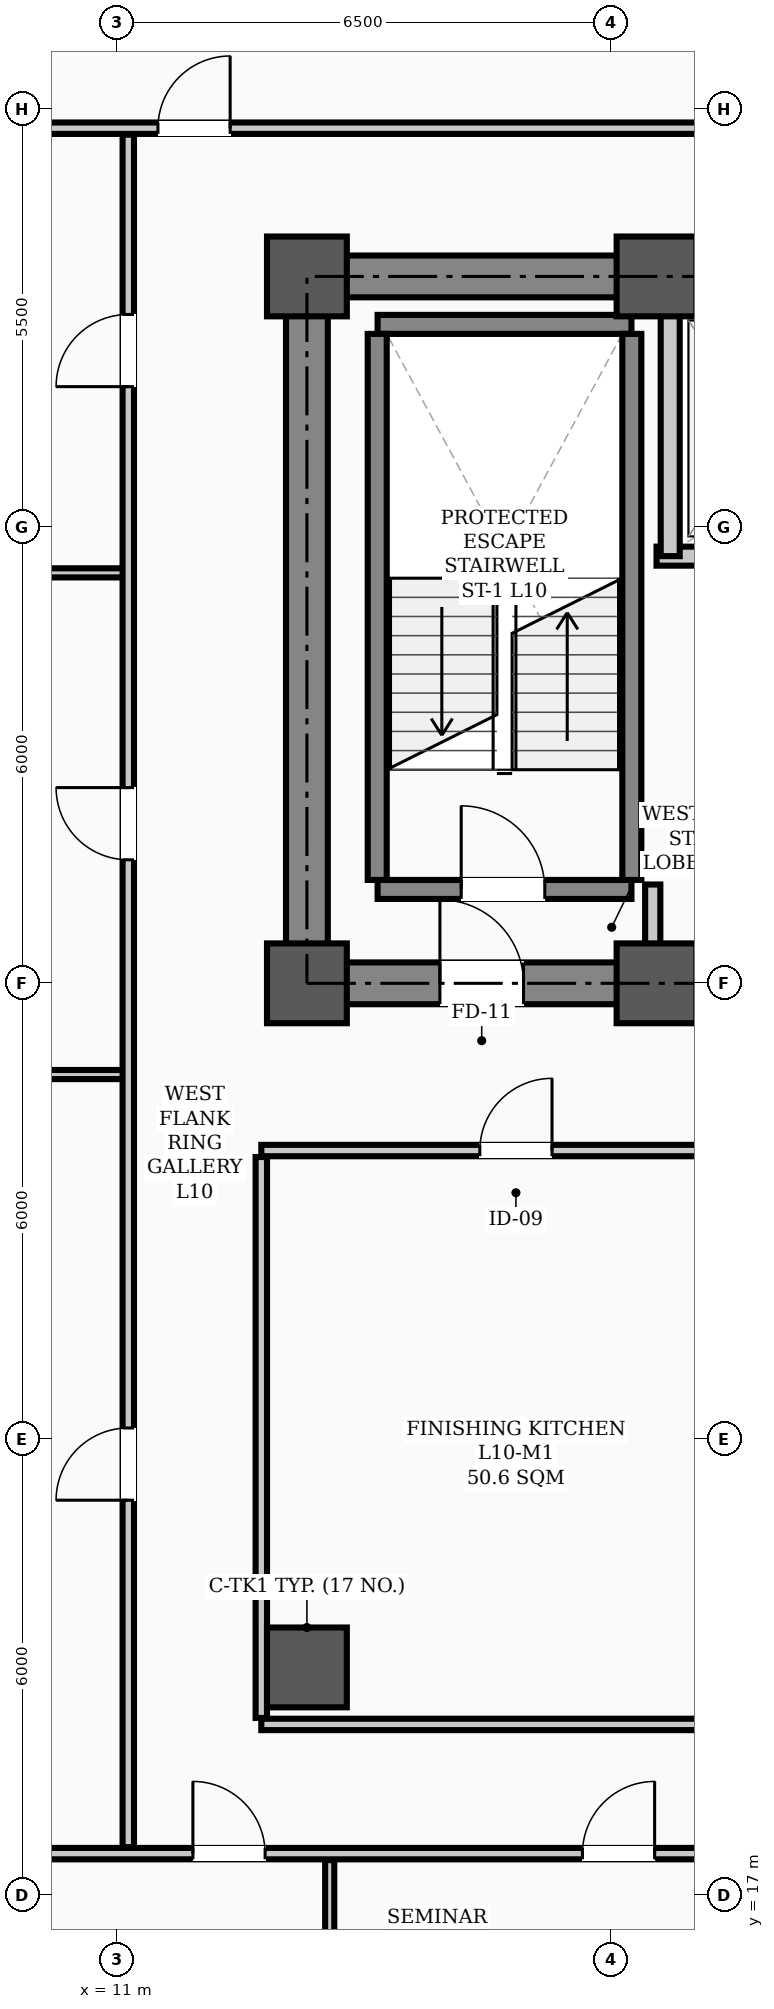
"""IFC4 building model, lengths in metres.
Left out: names, types, materials, properties, quantities, classifications, styles, units other than length and angle.
Written with IfcOpenShell. Run it as: python <this file> out.ifc"""

import sys

from ifc_helpers import new_model, si_unit, direction, frame, frame_2d, origin, origin_2d, place, context, subcontext, project, spatial, rectangle, hollow_rectangle, extrude, element, fill, save


model = new_model("IFC4")
c1 = context("Model", 3, precision=1e-05, world=origin(), true_north=direction((0.0, 1.0)))
c2 = subcontext(c1, "Body", "Model", "MODEL_VIEW")
j1 = project(units=[si_unit("LENGTHUNIT", "METRE"), si_unit("PLANEANGLEUNIT", "RADIAN")], contexts=[c1])
p1 = place(None, origin())
s1 = spatial("IfcSite", under=j1, at=p1, CompositionType="ELEMENT")
p2 = place(p1, origin())
s2 = spatial("IfcBuilding", under=s1, at=p2, CompositionType="ELEMENT")
p3 = place(p2, frame((0.0, 0.0, 42.1)))
s3 = spatial("IfcBuildingStorey", under=s2, at=p3, CompositionType="ELEMENT", Elevation=42.1)
for number, where, z_axis, x_axis in (
    (1, (13.5, 29.0, 0.0), (0.0, 0.0, 1.0), (1.0, 0.0, 0.0)),
    (2, (13.5, 38.3, 0.0), (0.0, 0.0, 1.0), (1.0, 0.0, 0.0)),
    (3, (18.1, 29.0, 0.0), (0.0, 0.0, 1.0), (1.0, 0.0, 0.0)),
    (4, (18.1, 38.3, 0.0), (0.0, 0.0, 1.0), (1.0, 0.0, 0.0)),
    (5, (13.5, 20.0, 0.0), (0.0, 0.0, 1.0), (1.0, 0.0, 0.0)),
):
    element("IfcColumn", number, at=place(p3, frame(where, z_axis=z_axis, x_axis=x_axis)), inside=s3, PredefinedType="COLUMN", context=c2, shape_type="SweptSolid", body=[
        extrude(hollow_rectangle(XDim=1.05, YDim=1.05, WallThickness=0.038, InnerFilletRadius=0.019, OuterFilletRadius=0.057, at=origin_2d()), origin(), (0.0, 0.0, 1.0), 3.9),
    ])
p4 = place(p3, frame((13.5, 29.0, 0.0), z_axis=(0.0, 0.0, 1.0), x_axis=(1.0, 0.0, 0.0)))
e6 = element("IfcWall", 6, at=p4, inside=s3, PredefinedType="SHEAR", context=c2, shape_type="SweptSolid", body=[
    extrude(rectangle(XDim=30.5, YDim=0.55, at=frame_2d((15.25, 0.0))), origin(), (0.0, 0.0, 1.0), 3.72),
])
p5 = place(p4, frame((1.75, 0.0, 0.0)))
e7 = element("IfcOpeningElement", 7, at=p5, cuts=e6, PredefinedType="OPENING", context=c2, shape_type="SweptSolid", body=[
    extrude(rectangle(XDim=1.1, YDim=2.08, at=frame_2d((0.55, 1.04))), frame((0.0, 0.285, 0.0), z_axis=(0.0, -1.0, 0.0), x_axis=(1.0, 0.0, 0.0)), (0.0, 0.0, 1.0), 0.57),
])
p6 = place(p4, frame((26.7, 0.0, 0.0)))
e8 = element("IfcOpeningElement", 8, at=p6, cuts=e6, PredefinedType="OPENING", context=c2, shape_type="SweptSolid", body=[
    extrude(rectangle(XDim=1.1, YDim=2.08, at=frame_2d((0.55, 1.04))), frame((0.0, 0.285, 0.0), z_axis=(0.0, -1.0, 0.0), x_axis=(1.0, 0.0, 0.0)), (0.0, 0.0, 1.0), 0.57),
])
p7 = place(p4, frame((6.8, 0.0, 0.0)))
e9 = element("IfcOpeningElement", 9, at=p7, cuts=e6, PredefinedType="OPENING", context=c2, shape_type="SweptSolid", body=[
    extrude(rectangle(XDim=1.1, YDim=2.08, at=frame_2d((0.55, 1.04))), frame((0.0, 0.285, 0.0), z_axis=(0.0, -1.0, 0.0), x_axis=(1.0, 0.0, 0.0)), (0.0, 0.0, 1.0), 0.57),
])
p8 = place(p4, frame((13.2, 0.0, 0.0)))
e10 = element("IfcOpeningElement", 10, at=p8, cuts=e6, PredefinedType="OPENING", context=c2, shape_type="SweptSolid", body=[
    extrude(rectangle(XDim=1.6, YDim=2.08, at=frame_2d((0.8, 1.04))), frame((0.0, 0.285, 0.0), z_axis=(0.0, -1.0, 0.0), x_axis=(1.0, 0.0, 0.0)), (0.0, 0.0, 1.0), 0.57),
])
p9 = place(p4, frame((20.525, 0.0, 0.0)))
e11 = element("IfcOpeningElement", 11, at=p9, cuts=e6, PredefinedType="OPENING", context=c2, shape_type="SweptSolid", body=[
    extrude(rectangle(XDim=0.95, YDim=2.08, at=frame_2d((0.475, 1.04))), frame((0.0, 0.285, 0.0), z_axis=(0.0, -1.0, 0.0), x_axis=(1.0, 0.0, 0.0)), (0.0, 0.0, 1.0), 0.57),
])
p10 = place(p3, frame((13.5, 38.3, 0.0), z_axis=(0.0, 0.0, 1.0), x_axis=(1.0, 0.0, 0.0)))
e12 = element("IfcWall", 12, at=p10, inside=s3, PredefinedType="SHEAR", context=c2, shape_type="SweptSolid", body=[
    extrude(rectangle(XDim=30.5, YDim=0.55, at=frame_2d((15.25, 0.0))), origin(), (0.0, 0.0, 1.0), 3.72),
])
p11 = place(p3, frame((13.5, 29.35, 0.0), z_axis=(0.0, 0.0, 1.0), x_axis=(0.0, 1.0, 0.0)))
e13 = element("IfcWall", 13, at=p11, inside=s3, PredefinedType="SHEAR", context=c2, shape_type="SweptSolid", body=[
    extrude(rectangle(XDim=8.6, YDim=0.55, at=frame_2d((4.3, 0.0))), origin(), (0.0, 0.0, 1.0), 3.72),
])
p12 = place(p3, frame((14.43, 30.235, 0.0), z_axis=(0.0, 0.0, 1.0), x_axis=(1.0, 0.0, 0.0)))
e14 = element("IfcWall", 14, at=p12, inside=s3, PredefinedType="STANDARD", context=c2, shape_type="SweptSolid", body=[
    extrude(rectangle(XDim=3.34, YDim=0.25, at=frame_2d((1.67, 0.0))), origin(), (0.0, 0.0, 1.0), 3.72),
])
p13 = place(p12, frame((1.1, 0.0, 0.0)))
e15 = element("IfcOpeningElement", 15, at=p13, cuts=e14, PredefinedType="OPENING", context=c2, shape_type="SweptSolid", body=[
    extrude(rectangle(XDim=1.1, YDim=2.08, at=frame_2d((0.55, 1.04))), frame((0.0, 0.135, 0.0), z_axis=(0.0, -1.0, 0.0), x_axis=(1.0, 0.0, 0.0)), (0.0, 0.0, 1.0), 0.27),
])
p14 = place(p3, frame((14.43, 37.669, 0.0), z_axis=(0.0, 0.0, 1.0), x_axis=(1.0, 0.0, 0.0)))
e16 = element("IfcWall", 16, at=p14, inside=s3, PredefinedType="STANDARD", context=c2, shape_type="SweptSolid", body=[
    extrude(rectangle(XDim=3.34, YDim=0.25, at=frame_2d((1.67, 0.0))), origin(), (0.0, 0.0, 1.0), 3.72),
])
for number, where, z_axis, x_axis in (
    (17, (14.425, 30.36, 0.0), (0.0, 0.0, 1.0), (0.0, 1.0, 0.0)),
    (18, (17.775, 30.36, 0.0), (0.0, 0.0, 1.0), (0.0, 1.0, 0.0)),
):
    element("IfcWall", number, at=place(p3, frame(where, z_axis=z_axis, x_axis=x_axis)), inside=s3, PredefinedType="STANDARD", context=c2, shape_type="SweptSolid", body=[
        extrude(rectangle(XDim=7.184, YDim=0.25, at=frame_2d((3.592, 0.0))), origin(), (0.0, 0.0, 1.0), 3.72),
    ])
p15 = place(p3, frame((18.1, 34.62, 0.0), z_axis=(0.0, 0.0, 1.0), x_axis=(1.0, 0.0, 0.0)))
e19 = element("IfcWall", 19, at=p15, inside=s3, PredefinedType="STANDARD", context=c2, shape_type="SweptSolid", body=[
    extrude(rectangle(XDim=5.35, YDim=0.25, at=frame_2d((2.675, 0.0))), origin(), (0.0, 0.0, 1.0), 3.72),
])
p16 = place(p15, frame((0.85, 0.0, 0.0)))
e20 = element("IfcOpeningElement", 20, at=p16, cuts=e19, PredefinedType="OPENING", context=c2, shape_type="SweptSolid", body=[
    extrude(rectangle(XDim=1.1, YDim=2.08, at=frame_2d((0.55, 1.04))), frame((0.0, 0.135, 0.0), z_axis=(0.0, -1.0, 0.0), x_axis=(1.0, 0.0, 0.0)), (0.0, 0.0, 1.0), 0.27),
])
p17 = place(p15, frame((3.45, 0.0, 0.0)))
e21 = element("IfcOpeningElement", 21, at=p17, cuts=e19, PredefinedType="OPENING", context=c2, shape_type="SweptSolid", body=[
    extrude(rectangle(XDim=1.1, YDim=2.08, at=frame_2d((0.55, 1.04))), frame((0.0, 0.135, 0.0), z_axis=(0.0, -1.0, 0.0), x_axis=(1.0, 0.0, 0.0)), (0.0, 0.0, 1.0), 0.27),
])
p18 = place(p3, frame((18.28, 34.62, 0.0), z_axis=(0.0, 0.0, 1.0), x_axis=(0.0, 1.0, 0.0)))
e22 = element("IfcWall", 22, at=p18, inside=s3, PredefinedType="STANDARD", context=c2, shape_type="SweptSolid", body=[
    extrude(rectangle(XDim=3.33, YDim=0.25, at=frame_2d((1.665, 0.0))), origin(), (0.0, 0.0, 1.0), 3.3),
])
p19 = place(p3, frame((12.9, 26.8, 0.0), z_axis=(0.0, 0.0, 1.0), x_axis=(1.0, 0.0, 0.0)))
e23 = element("IfcWall", 23, at=p19, inside=s3, PredefinedType="PARTITIONING", context=c2, shape_type="SweptSolid", body=[
    extrude(rectangle(XDim=31.7, YDim=0.15, at=frame_2d((15.85, 0.0))), origin(), (0.0, 0.0, 1.0), 3.1),
])
p20 = place(p19, frame((13.6, 0.0, 0.0)))
e24 = element("IfcOpeningElement", 24, at=p20, cuts=e23, PredefinedType="OPENING", context=c2, shape_type="SweptSolid", body=[
    extrude(rectangle(XDim=1.6, YDim=2.08, at=frame_2d((0.8, 1.04))), frame((0.0, 0.085, 0.0), z_axis=(0.0, -1.0, 0.0), x_axis=(1.0, 0.0, 0.0)), (0.0, 0.0, 1.0), 0.17),
])
p21 = place(p19, frame((2.875, 0.0, 0.0)))
e25 = element("IfcOpeningElement", 25, at=p21, cuts=e23, PredefinedType="OPENING", context=c2, shape_type="SweptSolid", body=[
    extrude(rectangle(XDim=0.95, YDim=2.08, at=frame_2d((0.475, 1.04))), frame((0.0, 0.085, 0.0), z_axis=(0.0, -1.0, 0.0), x_axis=(1.0, 0.0, 0.0)), (0.0, 0.0, 1.0), 0.17),
])
p22 = place(p19, frame((8.625, 0.0, 0.0)))
e26 = element("IfcOpeningElement", 26, at=p22, cuts=e23, PredefinedType="OPENING", context=c2, shape_type="SweptSolid", body=[
    extrude(rectangle(XDim=0.95, YDim=2.08, at=frame_2d((0.475, 1.04))), frame((0.0, 0.085, 0.0), z_axis=(0.0, -1.0, 0.0), x_axis=(1.0, 0.0, 0.0)), (0.0, 0.0, 1.0), 0.17),
])
p23 = place(p19, frame((16.075, 0.0, 0.0)))
e27 = element("IfcOpeningElement", 27, at=p23, cuts=e23, PredefinedType="OPENING", context=c2, shape_type="SweptSolid", body=[
    extrude(rectangle(XDim=0.95, YDim=2.08, at=frame_2d((0.475, 1.04))), frame((0.0, 0.085, 0.0), z_axis=(0.0, -1.0, 0.0), x_axis=(1.0, 0.0, 0.0)), (0.0, 0.0, 1.0), 0.17),
])
p24 = place(p19, frame((21.875, 0.0, 0.0)))
e28 = element("IfcOpeningElement", 28, at=p24, cuts=e23, PredefinedType="OPENING", context=c2, shape_type="SweptSolid", body=[
    extrude(rectangle(XDim=0.95, YDim=2.08, at=frame_2d((0.475, 1.04))), frame((0.0, 0.085, 0.0), z_axis=(0.0, -1.0, 0.0), x_axis=(1.0, 0.0, 0.0)), (0.0, 0.0, 1.0), 0.17),
])
p25 = place(p19, frame((29.025, 0.0, 0.0)))
e29 = element("IfcOpeningElement", 29, at=p25, cuts=e23, PredefinedType="OPENING", context=c2, shape_type="SweptSolid", body=[
    extrude(rectangle(XDim=0.95, YDim=2.08, at=frame_2d((0.475, 1.04))), frame((0.0, 0.085, 0.0), z_axis=(0.0, -1.0, 0.0), x_axis=(1.0, 0.0, 0.0)), (0.0, 0.0, 1.0), 0.17),
])
p26 = place(p3, frame((4.66, 17.55, 0.0), z_axis=(0.0, 0.0, 1.0), x_axis=(1.0, 0.0, 0.0)))
e30 = element("IfcWall", 30, at=p26, inside=s3, PredefinedType="PARTITIONING", context=c2, shape_type="SweptSolid", body=[
    extrude(rectangle(XDim=44.68, YDim=0.15, at=frame_2d((22.34, 0.0))), origin(), (0.0, 0.0, 1.0), 3.1),
])
p27 = place(p26, frame((7.34, 0.0, 0.0)))
e31 = element("IfcOpeningElement", 31, at=p27, cuts=e30, PredefinedType="OPENING", context=c2, shape_type="SweptSolid", body=[
    extrude(rectangle(XDim=0.95, YDim=2.08, at=frame_2d((0.475, 1.04))), frame((0.0, 0.085, 0.0), z_axis=(0.0, -1.0, 0.0), x_axis=(1.0, 0.0, 0.0)), (0.0, 0.0, 1.0), 0.17),
])
p28 = place(p26, frame((12.465, 0.0, 0.0)))
e32 = element("IfcOpeningElement", 32, at=p28, cuts=e30, PredefinedType="OPENING", context=c2, shape_type="SweptSolid", body=[
    extrude(rectangle(XDim=0.95, YDim=2.08, at=frame_2d((0.475, 1.04))), frame((0.0, 0.085, 0.0), z_axis=(0.0, -1.0, 0.0), x_axis=(1.0, 0.0, 0.0)), (0.0, 0.0, 1.0), 0.17),
])
p29 = place(p26, frame((29.265, 0.0, 0.0)))
e33 = element("IfcOpeningElement", 33, at=p29, cuts=e30, PredefinedType="OPENING", context=c2, shape_type="SweptSolid", body=[
    extrude(rectangle(XDim=0.95, YDim=2.08, at=frame_2d((0.475, 1.04))), frame((0.0, 0.085, 0.0), z_axis=(0.0, -1.0, 0.0), x_axis=(1.0, 0.0, 0.0)), (0.0, 0.0, 1.0), 0.17),
])
p30 = place(p26, frame((37.265, 0.0, 0.0)))
e34 = element("IfcOpeningElement", 34, at=p30, cuts=e30, PredefinedType="OPENING", context=c2, shape_type="SweptSolid", body=[
    extrude(rectangle(XDim=0.95, YDim=2.08, at=frame_2d((0.475, 1.04))), frame((0.0, 0.085, 0.0), z_axis=(0.0, -1.0, 0.0), x_axis=(1.0, 0.0, 0.0)), (0.0, 0.0, 1.0), 0.17),
])
p31 = place(p3, frame((12.9, 19.25, 0.0), z_axis=(0.0, 0.0, 1.0), x_axis=(1.0, 0.0, 0.0)))
e35 = element("IfcWall", 35, at=p31, inside=s3, PredefinedType="PARTITIONING", context=c2, shape_type="SweptSolid", body=[
    extrude(rectangle(XDim=13.3, YDim=0.15, at=frame_2d((6.65, 0.0))), origin(), (0.0, 0.0, 1.0), 3.1),
])
for number, where, z_axis, x_axis in (
    (36, (2.31, 27.8, 0.0), (0.0, 0.0, 1.0), (1.0, 0.0, 0.0)),
    (37, (2.31, 34.4, 0.0), (0.0, 0.0, 1.0), (1.0, 0.0, 0.0)),
):
    element("IfcWall", number, at=place(p3, frame(where, z_axis=z_axis, x_axis=x_axis)), inside=s3, PredefinedType="PARTITIONING", context=c2, shape_type="SweptSolid", body=[
        extrude(rectangle(XDim=8.84, YDim=0.12, at=frame_2d((4.42, 0.0))), origin(), (0.0, 0.0, 1.0), 3.212),
    ])
p32 = place(p3, frame((2.31, 40.25, 0.0), z_axis=(0.0, 0.0, 1.0), x_axis=(1.0, 0.0, 0.0)))
e38 = element("IfcWall", 38, at=p32, inside=s3, PredefinedType="PARTITIONING", context=c2, shape_type="SweptSolid", body=[
    extrude(rectangle(XDim=49.38, YDim=0.15, at=frame_2d((24.69, 0.0))), origin(), (0.0, 0.0, 1.0), 3.1),
])
p33 = place(p32, frame((9.23, 0.0, 0.0)))
e39 = element("IfcOpeningElement", 39, at=p33, cuts=e38, PredefinedType="OPENING", context=c2, shape_type="SweptSolid", body=[
    extrude(rectangle(XDim=0.95, YDim=2.08, at=frame_2d((0.475, 1.04))), frame((0.0, 0.085, 0.0), z_axis=(0.0, -1.0, 0.0), x_axis=(1.0, 0.0, 0.0)), (0.0, 0.0, 1.0), 0.17),
])
p34 = place(p32, frame((23.115, 0.0, 0.0)))
e40 = element("IfcOpeningElement", 40, at=p34, cuts=e38, PredefinedType="OPENING", context=c2, shape_type="SweptSolid", body=[
    extrude(rectangle(XDim=0.95, YDim=2.08, at=frame_2d((0.475, 1.04))), frame((0.0, 0.085, 0.0), z_axis=(0.0, -1.0, 0.0), x_axis=(1.0, 0.0, 0.0)), (0.0, 0.0, 1.0), 0.17),
])
p35 = place(p32, frame((31.515, 0.0, 0.0)))
e41 = element("IfcOpeningElement", 41, at=p35, cuts=e38, PredefinedType="OPENING", context=c2, shape_type="SweptSolid", body=[
    extrude(rectangle(XDim=0.95, YDim=2.08, at=frame_2d((0.475, 1.04))), frame((0.0, 0.085, 0.0), z_axis=(0.0, -1.0, 0.0), x_axis=(1.0, 0.0, 0.0)), (0.0, 0.0, 1.0), 0.17),
])
p36 = place(p32, frame((42.7, 0.0, 0.0)))
e42 = element("IfcOpeningElement", 42, at=p36, cuts=e38, PredefinedType="OPENING", context=c2, shape_type="SweptSolid", body=[
    extrude(rectangle(XDim=0.95, YDim=2.08, at=frame_2d((0.475, 1.04))), frame((0.0, 0.085, 0.0), z_axis=(0.0, -1.0, 0.0), x_axis=(1.0, 0.0, 0.0)), (0.0, 0.0, 1.0), 0.17),
])
p37 = place(p3, frame((18.05, 29.285, 0.0), z_axis=(0.0, 0.0, 1.0), x_axis=(0.0, 1.0, 0.0)))
e43 = element("IfcWall", 43, at=p37, inside=s3, PredefinedType="STANDARD", context=c2, shape_type="SweptSolid", body=[
    extrude(rectangle(XDim=1.015, YDim=0.2, at=frame_2d((0.508, 0.0))), origin(), (0.0, 0.0, 1.0), 3.3),
])
p38 = place(p3, frame((11.15, 17.635, 0.0), z_axis=(0.0, 0.0, 1.0), x_axis=(0.0, 1.0, 0.0)))
e44 = element("IfcWall", 44, at=p38, inside=s3, PredefinedType="PARTITIONING", context=c2, shape_type="SweptSolid", body=[
    extrude(rectangle(XDim=22.53, YDim=0.15, at=frame_2d((11.265, 0.0))), origin(), (0.0, 0.0, 1.0), 3.0),
])
p39 = place(p38, frame((4.565, 0.0, 0.0)))
e45 = element("IfcOpeningElement", 45, at=p39, cuts=e44, PredefinedType="OPENING", context=c2, shape_type="SweptSolid", body=[
    extrude(rectangle(XDim=0.95, YDim=2.08, at=frame_2d((0.475, 1.04))), frame((0.0, 0.085, 0.0), z_axis=(0.0, -1.0, 0.0), x_axis=(1.0, 0.0, 0.0)), (0.0, 0.0, 1.0), 0.17),
])
p40 = place(p38, frame((12.99, 0.0, 0.0)))
e46 = element("IfcOpeningElement", 46, at=p40, cuts=e44, PredefinedType="OPENING", context=c2, shape_type="SweptSolid", body=[
    extrude(rectangle(XDim=0.95, YDim=2.08, at=frame_2d((0.475, 1.04))), frame((0.0, 0.085, 0.0), z_axis=(0.0, -1.0, 0.0), x_axis=(1.0, 0.0, 0.0)), (0.0, 0.0, 1.0), 0.17),
])
p41 = place(p38, frame((19.215, 0.0, 0.0)))
e47 = element("IfcOpeningElement", 47, at=p41, cuts=e44, PredefinedType="OPENING", context=c2, shape_type="SweptSolid", body=[
    extrude(rectangle(XDim=0.95, YDim=2.08, at=frame_2d((0.475, 1.04))), frame((0.0, 0.085, 0.0), z_axis=(0.0, -1.0, 0.0), x_axis=(1.0, 0.0, 0.0)), (0.0, 0.0, 1.0), 0.17),
])
p42 = place(p3, frame((12.9, 19.335, 0.0), z_axis=(0.0, 0.0, 1.0), x_axis=(0.0, 1.0, 0.0)))
e48 = element("IfcWall", 48, at=p42, inside=s3, PredefinedType="PARTITIONING", context=c2, shape_type="SweptSolid", body=[
    extrude(rectangle(XDim=7.38, YDim=0.15, at=frame_2d((3.69, 0.0))), origin(), (0.0, 0.0, 1.0), 3.0),
])
p43 = place(p3, frame((13.8, 15.31, 0.0), z_axis=(0.0, 0.0, 1.0), x_axis=(0.0, 1.0, 0.0)))
e49 = element("IfcWall", 49, at=p43, inside=s3, PredefinedType="PARTITIONING", context=c2, shape_type="SweptSolid", body=[
    extrude(rectangle(XDim=2.155, YDim=0.12, at=frame_2d((1.078, 0.0))), origin(), (0.0, 0.0, 1.0), 3.1),
])
p44 = place(p13, origin())
e50 = element("IfcDoor", 50, at=p44, inside=s3, OperationType="SINGLE_SWING_LEFT", PredefinedType="DOOR", context=c2, shape_type="SweptSolid", body=[
    extrude(rectangle(XDim=1.1, YDim=2.08, at=frame_2d((0.55, 1.04))), frame((0.0, 0.025, 0.0), z_axis=(0.0, -1.0, 0.0), x_axis=(1.0, 0.0, 0.0)), (0.0, 0.0, 1.0), 0.05),
])
fill(e15, e50)
p45 = place(p5, origin())
e51 = element("IfcDoor", 51, at=p45, inside=s3, OperationType="SINGLE_SWING_LEFT", PredefinedType="DOOR", context=c2, shape_type="SweptSolid", body=[
    extrude(rectangle(XDim=1.1, YDim=2.08, at=frame_2d((0.55, 1.04))), frame((0.0, 0.025, 0.0), z_axis=(0.0, -1.0, 0.0), x_axis=(1.0, 0.0, 0.0)), (0.0, 0.0, 1.0), 0.05),
])
fill(e7, e51)
p46 = place(p27, origin())
e52 = element("IfcDoor", 52, at=p46, inside=s3, OperationType="SINGLE_SWING_LEFT", PredefinedType="DOOR", context=c2, shape_type="SweptSolid", body=[
    extrude(rectangle(XDim=0.95, YDim=2.08, at=frame_2d((0.475, 1.04))), frame((0.0, 0.025, 0.0), z_axis=(0.0, -1.0, 0.0), x_axis=(1.0, 0.0, 0.0)), (0.0, 0.0, 1.0), 0.05),
])
fill(e31, e52)
p47 = place(p28, origin())
e53 = element("IfcDoor", 53, at=p47, inside=s3, OperationType="SINGLE_SWING_RIGHT", PredefinedType="DOOR", context=c2, shape_type="SweptSolid", body=[
    extrude(rectangle(XDim=0.95, YDim=2.08, at=frame_2d((0.475, 1.04))), frame((0.0, 0.025, 0.0), z_axis=(0.0, -1.0, 0.0), x_axis=(1.0, 0.0, 0.0)), (0.0, 0.0, 1.0), 0.05),
])
fill(e32, e53)
p48 = place(p21, origin())
e54 = element("IfcDoor", 54, at=p48, inside=s3, OperationType="SINGLE_SWING_RIGHT", PredefinedType="DOOR", context=c2, shape_type="SweptSolid", body=[
    extrude(rectangle(XDim=0.95, YDim=2.08, at=frame_2d((0.475, 1.04))), frame((0.0, 0.025, 0.0), z_axis=(0.0, -1.0, 0.0), x_axis=(1.0, 0.0, 0.0)), (0.0, 0.0, 1.0), 0.05),
])
fill(e25, e54)
p49 = place(p39, origin())
e55 = element("IfcDoor", 55, at=p49, inside=s3, OperationType="SINGLE_SWING_LEFT", PredefinedType="DOOR", context=c2, shape_type="SweptSolid", body=[
    extrude(rectangle(XDim=0.95, YDim=2.08, at=frame_2d((0.475, 1.04))), frame((0.0, 0.025, 0.0), z_axis=(0.0, -1.0, 0.0), x_axis=(1.0, 0.0, 0.0)), (0.0, 0.0, 1.0), 0.05),
])
fill(e45, e55)
p50 = place(p40, origin())
e56 = element("IfcDoor", 56, at=p50, inside=s3, OperationType="SINGLE_SWING_RIGHT", PredefinedType="DOOR", context=c2, shape_type="SweptSolid", body=[
    extrude(rectangle(XDim=0.95, YDim=2.08, at=frame_2d((0.475, 1.04))), frame((0.0, 0.025, 0.0), z_axis=(0.0, -1.0, 0.0), x_axis=(1.0, 0.0, 0.0)), (0.0, 0.0, 1.0), 0.05),
])
fill(e46, e56)
p51 = place(p41, origin())
e57 = element("IfcDoor", 57, at=p51, inside=s3, OperationType="SINGLE_SWING_LEFT", PredefinedType="DOOR", context=c2, shape_type="SweptSolid", body=[
    extrude(rectangle(XDim=0.95, YDim=2.08, at=frame_2d((0.475, 1.04))), frame((0.0, 0.025, 0.0), z_axis=(0.0, -1.0, 0.0), x_axis=(1.0, 0.0, 0.0)), (0.0, 0.0, 1.0), 0.05),
])
fill(e47, e57)
p52 = place(p33, origin())
e58 = element("IfcDoor", 58, at=p52, inside=s3, OperationType="SINGLE_SWING_RIGHT", PredefinedType="DOOR", context=c2, shape_type="SweptSolid", body=[
    extrude(rectangle(XDim=0.95, YDim=2.08, at=frame_2d((0.475, 1.04))), frame((0.0, 0.025, 0.0), z_axis=(0.0, -1.0, 0.0), x_axis=(1.0, 0.0, 0.0)), (0.0, 0.0, 1.0), 0.05),
])
fill(e39, e58)
save(model, sys.argv[1])
